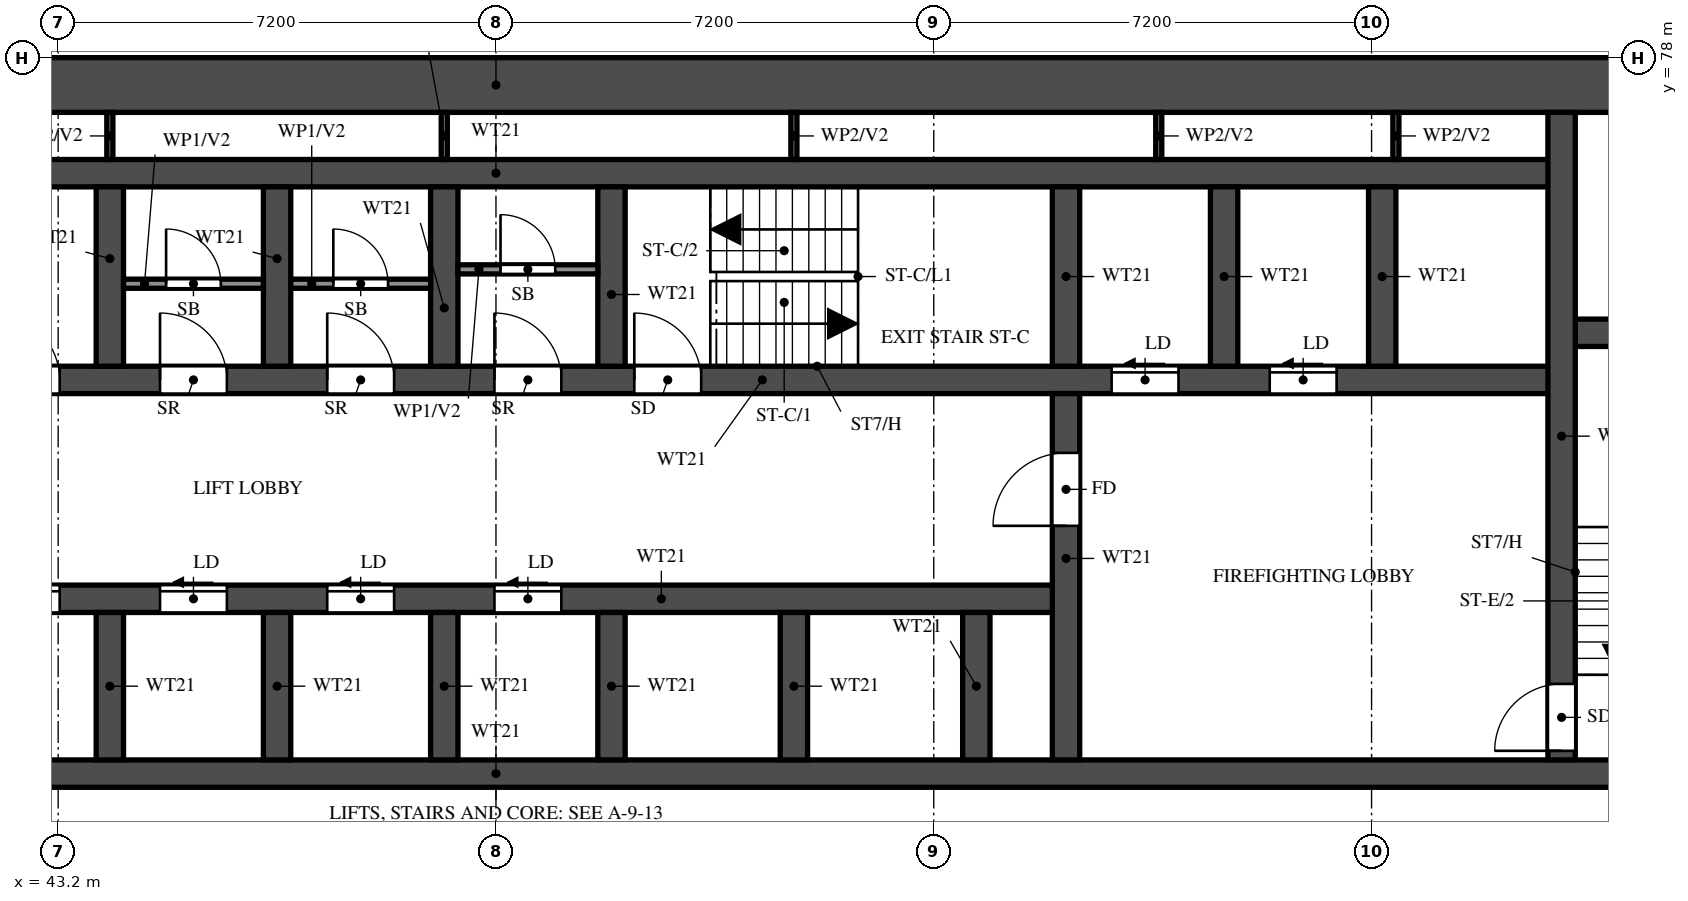
"""IFC4 building model, lengths in metres.
Left out: names, types, materials, properties, quantities, classifications, styles, units other than length and angle.
Written with IfcOpenShell. Run it as: python <this file> out.ifc"""

import sys

from ifc_helpers import new_model, si_unit, direction, frame, frame_2d, origin, place, context, subcontext, project, spatial, rectangle, extrude, element, fill, save


model = new_model("IFC4")
c1 = context("Model", 3, precision=1e-05, world=origin(), true_north=direction((0.0, 1.0)))
c2 = subcontext(c1, "Body", "Model", "MODEL_VIEW")
j1 = project(units=[si_unit("LENGTHUNIT", "METRE"), si_unit("PLANEANGLEUNIT", "RADIAN")], contexts=[c1])
p1 = place(None, origin())
s1 = spatial("IfcSite", under=j1, at=p1, CompositionType="ELEMENT")
p2 = place(p1, origin())
s2 = spatial("IfcBuilding", under=s1, at=p2, CompositionType="ELEMENT")
p3 = place(p2, frame((0.0, 0.0, 83.0)))
s3 = spatial("IfcBuildingStorey", under=s2, at=p3, CompositionType="ELEMENT", Elevation=83.0)
p4 = place(p3, frame((29.7, 77.55, 0.0), z_axis=(0.0, 0.0, 1.0), x_axis=(1.0, 0.0, 0.0)))
e1 = element("IfcWall", 1, at=p4, inside=s3, PredefinedType="SHEAR", context=c2, shape_type="SweptSolid", body=[
    extrude(rectangle(XDim=41.4, YDim=0.9, at=frame_2d((20.7, 0.0))), origin(), (0.0, 0.0, 1.0), 3.18),
])
p5 = place(p3, frame((29.7, 66.225, 0.0), z_axis=(0.0, 0.0, 1.0), x_axis=(1.0, 0.0, 0.0)))
e2 = element("IfcWall", 2, at=p5, inside=s3, PredefinedType="SHEAR", context=c2, shape_type="SweptSolid", body=[
    extrude(rectangle(XDim=41.4, YDim=0.45, at=frame_2d((20.7, 0.0))), origin(), (0.0, 0.0, 1.0), 3.18),
])
p6 = place(p5, frame((0.925, 0.0, 0.0)))
e3 = element("IfcOpeningElement", 3, at=p6, cuts=e2, PredefinedType="OPENING", context=c2, shape_type="SweptSolid", body=[
    extrude(rectangle(XDim=1.1, YDim=2.1, at=frame_2d((0.55, 1.05))), frame((0.0, 0.235, 0.0), z_axis=(0.0, -1.0, 0.0), x_axis=(1.0, 0.0, 0.0)), (0.0, 0.0, 1.0), 0.47),
])
p7 = place(p5, frame((3.738, 0.0, 0.0)))
e4 = element("IfcOpeningElement", 4, at=p7, cuts=e2, PredefinedType="OPENING", context=c2, shape_type="SweptSolid", body=[
    extrude(rectangle(XDim=1.8, YDim=2.1, at=frame_2d((0.9, 1.05))), frame((0.0, 0.235, 0.0), z_axis=(0.0, -1.0, 0.0), x_axis=(1.0, 0.0, 0.0)), (0.0, 0.0, 1.0), 0.47),
])
p8 = place(p3, frame((35.575, 69.1, 0.0), z_axis=(0.0, 0.0, 1.0), x_axis=(1.0, 0.0, 0.0)))
e5 = element("IfcWall", 5, at=p8, inside=s3, PredefinedType="SHEAR", context=c2, shape_type="SweptSolid", body=[
    extrude(rectangle(XDim=24.2, YDim=0.45, at=frame_2d((12.1, 0.0))), origin(), (0.0, 0.0, 1.0), 3.18),
])
p9 = place(p8, frame((1.05, 0.0, 0.0)))
e6 = element("IfcOpeningElement", 6, at=p9, cuts=e5, PredefinedType="OPENING", context=c2, shape_type="SweptSolid", body=[
    extrude(rectangle(XDim=1.1, YDim=2.1, at=frame_2d((0.55, 1.05))), frame((0.0, 0.235, 0.0), z_axis=(0.0, -1.0, 0.0), x_axis=(1.0, 0.0, 0.0)), (0.0, 0.0, 1.0), 0.47),
])
p10 = place(p8, frame((3.8, 0.0, 0.0)))
e7 = element("IfcOpeningElement", 7, at=p10, cuts=e5, PredefinedType="OPENING", context=c2, shape_type="SweptSolid", body=[
    extrude(rectangle(XDim=1.1, YDim=2.1, at=frame_2d((0.55, 1.05))), frame((0.0, 0.235, 0.0), z_axis=(0.0, -1.0, 0.0), x_axis=(1.0, 0.0, 0.0)), (0.0, 0.0, 1.0), 0.47),
])
p11 = place(p8, frame((6.55, 0.0, 0.0)))
e8 = element("IfcOpeningElement", 8, at=p11, cuts=e5, PredefinedType="OPENING", context=c2, shape_type="SweptSolid", body=[
    extrude(rectangle(XDim=1.1, YDim=2.1, at=frame_2d((0.55, 1.05))), frame((0.0, 0.235, 0.0), z_axis=(0.0, -1.0, 0.0), x_axis=(1.0, 0.0, 0.0)), (0.0, 0.0, 1.0), 0.47),
])
p12 = place(p8, frame((9.3, 0.0, 0.0)))
e9 = element("IfcOpeningElement", 9, at=p12, cuts=e5, PredefinedType="OPENING", context=c2, shape_type="SweptSolid", body=[
    extrude(rectangle(XDim=1.1, YDim=2.1, at=frame_2d((0.55, 1.05))), frame((0.0, 0.235, 0.0), z_axis=(0.0, -1.0, 0.0), x_axis=(1.0, 0.0, 0.0)), (0.0, 0.0, 1.0), 0.47),
])
p13 = place(p8, frame((12.05, 0.0, 0.0)))
e10 = element("IfcOpeningElement", 10, at=p13, cuts=e5, PredefinedType="OPENING", context=c2, shape_type="SweptSolid", body=[
    extrude(rectangle(XDim=1.1, YDim=2.1, at=frame_2d((0.55, 1.05))), frame((0.0, 0.235, 0.0), z_axis=(0.0, -1.0, 0.0), x_axis=(1.0, 0.0, 0.0)), (0.0, 0.0, 1.0), 0.47),
])
p14 = place(p8, frame((14.8, 0.0, 0.0)))
e11 = element("IfcOpeningElement", 11, at=p14, cuts=e5, PredefinedType="OPENING", context=c2, shape_type="SweptSolid", body=[
    extrude(rectangle(XDim=1.1, YDim=2.1, at=frame_2d((0.55, 1.05))), frame((0.0, 0.235, 0.0), z_axis=(0.0, -1.0, 0.0), x_axis=(1.0, 0.0, 0.0)), (0.0, 0.0, 1.0), 0.47),
])
p15 = place(p3, frame((32.875, 72.7, 0.0), z_axis=(0.0, 0.0, 1.0), x_axis=(1.0, 0.0, 0.0)))
e12 = element("IfcWall", 12, at=p15, inside=s3, PredefinedType="SHEAR", context=c2, shape_type="SweptSolid", body=[
    extrude(rectangle(XDim=35.05, YDim=0.45, at=frame_2d((17.525, 0.0))), origin(), (0.0, 0.0, 1.0), 3.18),
])
p16 = place(p15, frame((19.8, 0.0, 0.0)))
e13 = element("IfcOpeningElement", 13, at=p16, cuts=e12, PredefinedType="OPENING", context=c2, shape_type="SweptSolid", body=[
    extrude(rectangle(XDim=1.1, YDim=2.1, at=frame_2d((0.55, 1.05))), frame((0.0, 0.235, 0.0), z_axis=(0.0, -1.0, 0.0), x_axis=(1.0, 0.0, 0.0)), (0.0, 0.0, 1.0), 0.47),
])
p17 = place(p15, frame((27.65, 0.0, 0.0)))
e14 = element("IfcOpeningElement", 14, at=p17, cuts=e12, PredefinedType="OPENING", context=c2, shape_type="SweptSolid", body=[
    extrude(rectangle(XDim=1.1, YDim=2.1, at=frame_2d((0.55, 1.05))), frame((0.0, 0.235, 0.0), z_axis=(0.0, -1.0, 0.0), x_axis=(1.0, 0.0, 0.0)), (0.0, 0.0, 1.0), 0.47),
])
p18 = place(p15, frame((30.25, 0.0, 0.0)))
e15 = element("IfcOpeningElement", 15, at=p18, cuts=e12, PredefinedType="OPENING", context=c2, shape_type="SweptSolid", body=[
    extrude(rectangle(XDim=1.1, YDim=2.1, at=frame_2d((0.55, 1.05))), frame((0.0, 0.235, 0.0), z_axis=(0.0, -1.0, 0.0), x_axis=(1.0, 0.0, 0.0)), (0.0, 0.0, 1.0), 0.47),
])
p19 = place(p15, frame((3.75, 0.0, 0.0)))
e16 = element("IfcOpeningElement", 16, at=p19, cuts=e12, PredefinedType="OPENING", context=c2, shape_type="SweptSolid", body=[
    extrude(rectangle(XDim=1.1, YDim=2.1, at=frame_2d((0.55, 1.05))), frame((0.0, 0.235, 0.0), z_axis=(0.0, -1.0, 0.0), x_axis=(1.0, 0.0, 0.0)), (0.0, 0.0, 1.0), 0.47),
])
p20 = place(p15, frame((6.5, 0.0, 0.0)))
e17 = element("IfcOpeningElement", 17, at=p20, cuts=e12, PredefinedType="OPENING", context=c2, shape_type="SweptSolid", body=[
    extrude(rectangle(XDim=1.1, YDim=2.1, at=frame_2d((0.55, 1.05))), frame((0.0, 0.235, 0.0), z_axis=(0.0, -1.0, 0.0), x_axis=(1.0, 0.0, 0.0)), (0.0, 0.0, 1.0), 0.47),
])
p21 = place(p15, frame((9.25, 0.0, 0.0)))
e18 = element("IfcOpeningElement", 18, at=p21, cuts=e12, PredefinedType="OPENING", context=c2, shape_type="SweptSolid", body=[
    extrude(rectangle(XDim=1.1, YDim=2.1, at=frame_2d((0.55, 1.05))), frame((0.0, 0.235, 0.0), z_axis=(0.0, -1.0, 0.0), x_axis=(1.0, 0.0, 0.0)), (0.0, 0.0, 1.0), 0.47),
])
p22 = place(p15, frame((12.0, 0.0, 0.0)))
e19 = element("IfcOpeningElement", 19, at=p22, cuts=e12, PredefinedType="OPENING", context=c2, shape_type="SweptSolid", body=[
    extrude(rectangle(XDim=1.1, YDim=2.1, at=frame_2d((0.55, 1.05))), frame((0.0, 0.235, 0.0), z_axis=(0.0, -1.0, 0.0), x_axis=(1.0, 0.0, 0.0)), (0.0, 0.0, 1.0), 0.47),
])
p23 = place(p15, frame((14.75, 0.0, 0.0)))
e20 = element("IfcOpeningElement", 20, at=p23, cuts=e12, PredefinedType="OPENING", context=c2, shape_type="SweptSolid", body=[
    extrude(rectangle(XDim=1.1, YDim=2.1, at=frame_2d((0.55, 1.05))), frame((0.0, 0.235, 0.0), z_axis=(0.0, -1.0, 0.0), x_axis=(1.0, 0.0, 0.0)), (0.0, 0.0, 1.0), 0.47),
])
p24 = place(p15, frame((17.5, 0.0, 0.0)))
e21 = element("IfcOpeningElement", 21, at=p24, cuts=e12, PredefinedType="OPENING", context=c2, shape_type="SweptSolid", body=[
    extrude(rectangle(XDim=1.1, YDim=2.1, at=frame_2d((0.55, 1.05))), frame((0.0, 0.235, 0.0), z_axis=(0.0, -1.0, 0.0), x_axis=(1.0, 0.0, 0.0)), (0.0, 0.0, 1.0), 0.47),
])
p25 = place(p15, frame((0.913, 0.0, 0.0)))
e22 = element("IfcOpeningElement", 22, at=p25, cuts=e12, PredefinedType="OPENING", context=c2, shape_type="SweptSolid", body=[
    extrude(rectangle(XDim=1.1, YDim=2.1, at=frame_2d((0.55, 1.05))), frame((0.0, 0.235, 0.0), z_axis=(0.0, -1.0, 0.0), x_axis=(1.0, 0.0, 0.0)), (0.0, 0.0, 1.0), 0.47),
])
p26 = place(p3, frame((32.875, 76.1, 0.0), z_axis=(0.0, 0.0, 1.0), x_axis=(1.0, 0.0, 0.0)))
e23 = element("IfcWall", 23, at=p26, inside=s3, PredefinedType="SHEAR", context=c2, shape_type="SweptSolid", body=[
    extrude(rectangle(XDim=35.05, YDim=0.45, at=frame_2d((17.525, 0.0))), origin(), (0.0, 0.0, 1.0), 3.18),
])
p27 = place(p3, frame((67.925, 73.475, 0.0), z_axis=(0.0, 0.0, 1.0), x_axis=(1.0, 0.0, 0.0)))
e24 = element("IfcWall", 24, at=p27, inside=s3, PredefinedType="SHEAR", context=c2, shape_type="SweptSolid", body=[
    extrude(rectangle(XDim=3.175, YDim=0.45, at=frame_2d((1.587, 0.0))), origin(), (0.0, 0.0, 1.0), 3.18),
])
p28 = place(p3, frame((67.925, 66.45, 0.0), z_axis=(0.0, 0.0, 1.0), x_axis=(0.0, 1.0, 0.0)))
e25 = element("IfcWall", 25, at=p28, inside=s3, PredefinedType="SHEAR", context=c2, shape_type="SweptSolid", body=[
    extrude(rectangle(XDim=10.65, YDim=0.45, at=frame_2d((5.325, 0.0))), origin(), (0.0, 0.0, 1.0), 3.18),
])
p29 = place(p28, frame((0.15, 0.0, 0.0)))
e26 = element("IfcOpeningElement", 26, at=p29, cuts=e25, PredefinedType="OPENING", context=c2, shape_type="SweptSolid", body=[
    extrude(rectangle(XDim=1.1, YDim=2.1, at=frame_2d((0.55, 1.05))), frame((0.0, 0.235, 0.0), z_axis=(0.0, -1.0, 0.0), x_axis=(1.0, 0.0, 0.0)), (0.0, 0.0, 1.0), 0.47),
])
p30 = place(p3, frame((59.775, 66.45, 0.0), z_axis=(0.0, 0.0, 1.0), x_axis=(0.0, 1.0, 0.0)))
e27 = element("IfcWall", 27, at=p30, inside=s3, PredefinedType="SHEAR", context=c2, shape_type="SweptSolid", body=[
    extrude(rectangle(XDim=6.025, YDim=0.45, at=frame_2d((3.013, 0.0))), origin(), (0.0, 0.0, 1.0), 3.18),
])
p31 = place(p30, frame((3.85, 0.0, 0.0)))
e28 = element("IfcOpeningElement", 28, at=p31, cuts=e27, PredefinedType="OPENING", context=c2, shape_type="SweptSolid", body=[
    extrude(rectangle(XDim=1.2, YDim=2.1, at=frame_2d((0.6, 1.05))), frame((0.0, 0.235, 0.0), z_axis=(0.0, -1.0, 0.0), x_axis=(1.0, 0.0, 0.0)), (0.0, 0.0, 1.0), 0.47),
])
p32 = place(p3, frame((59.775, 72.925, 0.0), z_axis=(0.0, 0.0, 1.0), x_axis=(0.0, 1.0, 0.0)))
e29 = element("IfcWall", 29, at=p32, inside=s3, PredefinedType="SHEAR", context=c2, shape_type="SweptSolid", body=[
    extrude(rectangle(XDim=2.95, YDim=0.45, at=frame_2d((1.475, 0.0))), origin(), (0.0, 0.0, 1.0), 3.18),
])
for number, where, z_axis, x_axis in (
    (30, (44.05, 66.45, 0.0), (0.0, 0.0, 1.0), (0.0, 1.0, 0.0)),
    (31, (46.8, 66.45, 0.0), (0.0, 0.0, 1.0), (0.0, 1.0, 0.0)),
    (32, (49.55, 66.45, 0.0), (0.0, 0.0, 1.0), (0.0, 1.0, 0.0)),
    (33, (52.3, 66.45, 0.0), (0.0, 0.0, 1.0), (0.0, 1.0, 0.0)),
    (34, (55.3, 66.45, 0.0), (0.0, 0.0, 1.0), (0.0, 1.0, 0.0)),
    (35, (58.3, 66.45, 0.0), (0.0, 0.0, 1.0), (0.0, 1.0, 0.0)),
):
    element("IfcWall", number, at=place(p3, frame(where, z_axis=z_axis, x_axis=x_axis)), inside=s3, PredefinedType="SHEAR", context=c2, shape_type="SweptSolid", body=[
        extrude(rectangle(XDim=2.425, YDim=0.45, at=frame_2d((1.212, 0.0))), origin(), (0.0, 0.0, 1.0), 3.18),
    ])
for number, where, z_axis, x_axis in (
    (36, (44.05, 72.925, 0.0), (0.0, 0.0, 1.0), (0.0, 1.0, 0.0)),
    (37, (46.8, 72.925, 0.0), (0.0, 0.0, 1.0), (0.0, 1.0, 0.0)),
    (38, (49.55, 72.925, 0.0), (0.0, 0.0, 1.0), (0.0, 1.0, 0.0)),
    (39, (52.3, 72.925, 0.0), (0.0, 0.0, 1.0), (0.0, 1.0, 0.0)),
    (40, (62.375, 72.925, 0.0), (0.0, 0.0, 1.0), (0.0, 1.0, 0.0)),
    (41, (64.975, 72.925, 0.0), (0.0, 0.0, 1.0), (0.0, 1.0, 0.0)),
):
    element("IfcWall", number, at=place(p3, frame(where, z_axis=z_axis, x_axis=x_axis)), inside=s3, PredefinedType="SHEAR", context=c2, shape_type="SweptSolid", body=[
        extrude(rectangle(XDim=2.95, YDim=0.45, at=frame_2d((1.475, 0.0))), origin(), (0.0, 0.0, 1.0), 3.18),
    ])
p33 = place(p3, frame((44.275, 74.282, 0.0), z_axis=(0.0, 0.0, 1.0), x_axis=(1.0, 0.0, 0.0)))
e42 = element("IfcWall", 42, at=p33, inside=s3, PredefinedType="PARTITIONING", context=c2, shape_type="SweptSolid", body=[
    extrude(rectangle(XDim=2.3, YDim=0.15, at=frame_2d((1.15, 0.0))), origin(), (0.0, 0.0, 1.0), 3.18),
])
p34 = place(p33, frame((0.7, 0.0, 0.0)))
e43 = element("IfcOpeningElement", 43, at=p34, cuts=e42, PredefinedType="OPENING", context=c2, shape_type="SweptSolid", body=[
    extrude(rectangle(XDim=0.9, YDim=2.1, at=frame_2d((0.45, 1.05))), frame((0.0, 0.085, 0.0), z_axis=(0.0, -1.0, 0.0), x_axis=(1.0, 0.0, 0.0)), (0.0, 0.0, 1.0), 0.17),
])
p35 = place(p3, frame((47.025, 74.282, 0.0), z_axis=(0.0, 0.0, 1.0), x_axis=(1.0, 0.0, 0.0)))
e44 = element("IfcWall", 44, at=p35, inside=s3, PredefinedType="PARTITIONING", context=c2, shape_type="SweptSolid", body=[
    extrude(rectangle(XDim=2.3, YDim=0.15, at=frame_2d((1.15, 0.0))), origin(), (0.0, 0.0, 1.0), 3.18),
])
p36 = place(p35, frame((0.7, 0.0, 0.0)))
e45 = element("IfcOpeningElement", 45, at=p36, cuts=e44, PredefinedType="OPENING", context=c2, shape_type="SweptSolid", body=[
    extrude(rectangle(XDim=0.9, YDim=2.1, at=frame_2d((0.45, 1.05))), frame((0.0, 0.085, 0.0), z_axis=(0.0, -1.0, 0.0), x_axis=(1.0, 0.0, 0.0)), (0.0, 0.0, 1.0), 0.17),
])
p37 = place(p3, frame((49.775, 74.518, 0.0), z_axis=(0.0, 0.0, 1.0), x_axis=(1.0, 0.0, 0.0)))
e46 = element("IfcWall", 46, at=p37, inside=s3, PredefinedType="PARTITIONING", context=c2, shape_type="SweptSolid", body=[
    extrude(rectangle(XDim=2.3, YDim=0.15, at=frame_2d((1.15, 0.0))), origin(), (0.0, 0.0, 1.0), 3.18),
])
p38 = place(p37, frame((0.7, 0.0, 0.0)))
e47 = element("IfcOpeningElement", 47, at=p38, cuts=e46, PredefinedType="OPENING", context=c2, shape_type="SweptSolid", body=[
    extrude(rectangle(XDim=0.9, YDim=2.1, at=frame_2d((0.45, 1.05))), frame((0.0, 0.085, 0.0), z_axis=(0.0, -1.0, 0.0), x_axis=(1.0, 0.0, 0.0)), (0.0, 0.0, 1.0), 0.17),
])
for number, where, z_axis, x_axis in (
    (48, (44.05, 76.325, 0.0), (0.0, 0.0, 1.0), (0.0, 1.0, 0.0)),
    (49, (49.55, 76.325, 0.0), (0.0, 0.0, 1.0), (0.0, 1.0, 0.0)),
    (50, (55.3, 76.325, 0.0), (0.0, 0.0, 1.0), (0.0, 1.0, 0.0)),
    (51, (61.3, 76.325, 0.0), (0.0, 0.0, 1.0), (0.0, 1.0, 0.0)),
    (52, (65.2, 76.325, 0.0), (0.0, 0.0, 1.0), (0.0, 1.0, 0.0)),
):
    element("IfcWall", number, at=place(p3, frame(where, z_axis=z_axis, x_axis=x_axis)), inside=s3, PredefinedType="PARTITIONING", context=c2, shape_type="SweptSolid", body=[
        extrude(rectangle(XDim=0.775, YDim=0.1, at=frame_2d((0.388, 0.0))), origin(), (0.0, 0.0, 1.0), 3.18),
    ])
p39 = place(p16, origin())
e53 = element("IfcDoor", 53, at=p39, inside=s3, OperationType="SINGLE_SWING_LEFT", PredefinedType="DOOR", context=c2, shape_type="SweptSolid", body=[
    extrude(rectangle(XDim=1.1, YDim=2.1, at=frame_2d((0.55, 1.05))), frame((0.0, 0.025, 0.0), z_axis=(0.0, -1.0, 0.0), x_axis=(1.0, 0.0, 0.0)), (0.0, 0.0, 1.0), 0.05),
])
fill(e13, e53)
p40 = place(p29, origin())
e54 = element("IfcDoor", 54, at=p40, inside=s3, OperationType="SINGLE_SWING_LEFT", PredefinedType="DOOR", context=c2, shape_type="SweptSolid", body=[
    extrude(rectangle(XDim=1.1, YDim=2.1, at=frame_2d((0.55, 1.05))), frame((0.0, 0.025, 0.0), z_axis=(0.0, -1.0, 0.0), x_axis=(1.0, 0.0, 0.0)), (0.0, 0.0, 1.0), 0.05),
])
fill(e26, e54)
p41 = place(p31, origin())
e55 = element("IfcDoor", 55, at=p41, inside=s3, OperationType="SINGLE_SWING_RIGHT", PredefinedType="DOOR", context=c2, shape_type="SweptSolid", body=[
    extrude(rectangle(XDim=1.2, YDim=2.1, at=frame_2d((0.6, 1.05))), frame((0.0, 0.025, 0.0), z_axis=(0.0, -1.0, 0.0), x_axis=(1.0, 0.0, 0.0)), (0.0, 0.0, 1.0), 0.05),
])
fill(e28, e55)
p42 = place(p17, origin())
e56 = element("IfcDoor", 56, at=p42, inside=s3, OperationType="SLIDING_TO_LEFT", PredefinedType="DOOR", context=c2, shape_type="SweptSolid", body=[
    extrude(rectangle(XDim=1.1, YDim=2.1, at=frame_2d((0.55, 1.05))), frame((0.0, 0.025, 0.0), z_axis=(0.0, -1.0, 0.0), x_axis=(1.0, 0.0, 0.0)), (0.0, 0.0, 1.0), 0.05),
])
fill(e14, e56)
p43 = place(p18, origin())
e57 = element("IfcDoor", 57, at=p43, inside=s3, OperationType="SLIDING_TO_LEFT", PredefinedType="DOOR", context=c2, shape_type="SweptSolid", body=[
    extrude(rectangle(XDim=1.1, YDim=2.1, at=frame_2d((0.55, 1.05))), frame((0.0, 0.025, 0.0), z_axis=(0.0, -1.0, 0.0), x_axis=(1.0, 0.0, 0.0)), (0.0, 0.0, 1.0), 0.05),
])
fill(e15, e57)
p44 = place(p11, origin())
e58 = element("IfcDoor", 58, at=p44, inside=s3, OperationType="SLIDING_TO_LEFT", PredefinedType="DOOR", context=c2, shape_type="SweptSolid", body=[
    extrude(rectangle(XDim=1.1, YDim=2.1, at=frame_2d((0.55, 1.05))), frame((0.0, 0.025, 0.0), z_axis=(0.0, -1.0, 0.0), x_axis=(1.0, 0.0, 0.0)), (0.0, 0.0, 1.0), 0.05),
])
fill(e8, e58)
p45 = place(p12, origin())
e59 = element("IfcDoor", 59, at=p45, inside=s3, OperationType="SLIDING_TO_LEFT", PredefinedType="DOOR", context=c2, shape_type="SweptSolid", body=[
    extrude(rectangle(XDim=1.1, YDim=2.1, at=frame_2d((0.55, 1.05))), frame((0.0, 0.025, 0.0), z_axis=(0.0, -1.0, 0.0), x_axis=(1.0, 0.0, 0.0)), (0.0, 0.0, 1.0), 0.05),
])
fill(e9, e59)
p46 = place(p13, origin())
e60 = element("IfcDoor", 60, at=p46, inside=s3, OperationType="SLIDING_TO_LEFT", PredefinedType="DOOR", context=c2, shape_type="SweptSolid", body=[
    extrude(rectangle(XDim=1.1, YDim=2.1, at=frame_2d((0.55, 1.05))), frame((0.0, 0.025, 0.0), z_axis=(0.0, -1.0, 0.0), x_axis=(1.0, 0.0, 0.0)), (0.0, 0.0, 1.0), 0.05),
])
fill(e10, e60)
p47 = place(p14, origin())
e61 = element("IfcDoor", 61, at=p47, inside=s3, OperationType="SLIDING_TO_LEFT", PredefinedType="DOOR", context=c2, shape_type="SweptSolid", body=[
    extrude(rectangle(XDim=1.1, YDim=2.1, at=frame_2d((0.55, 1.05))), frame((0.0, 0.025, 0.0), z_axis=(0.0, -1.0, 0.0), x_axis=(1.0, 0.0, 0.0)), (0.0, 0.0, 1.0), 0.05),
])
fill(e11, e61)
p48 = place(p21, origin())
e62 = element("IfcDoor", 62, at=p48, inside=s3, OperationType="SINGLE_SWING_LEFT", PredefinedType="DOOR", context=c2, shape_type="SweptSolid", body=[
    extrude(rectangle(XDim=1.1, YDim=2.1, at=frame_2d((0.55, 1.05))), frame((0.0, 0.025, 0.0), z_axis=(0.0, -1.0, 0.0), x_axis=(1.0, 0.0, 0.0)), (0.0, 0.0, 1.0), 0.05),
])
fill(e18, e62)
p49 = place(p22, origin())
e63 = element("IfcDoor", 63, at=p49, inside=s3, OperationType="SINGLE_SWING_LEFT", PredefinedType="DOOR", context=c2, shape_type="SweptSolid", body=[
    extrude(rectangle(XDim=1.1, YDim=2.1, at=frame_2d((0.55, 1.05))), frame((0.0, 0.025, 0.0), z_axis=(0.0, -1.0, 0.0), x_axis=(1.0, 0.0, 0.0)), (0.0, 0.0, 1.0), 0.05),
])
fill(e19, e63)
p50 = place(p34, origin())
e64 = element("IfcDoor", 64, at=p50, inside=s3, OperationType="SINGLE_SWING_RIGHT", PredefinedType="DOOR", context=c2, shape_type="SweptSolid", body=[
    extrude(rectangle(XDim=0.9, YDim=2.1, at=frame_2d((0.45, 1.05))), frame((0.0, 0.025, 0.0), z_axis=(0.0, -1.0, 0.0), x_axis=(1.0, 0.0, 0.0)), (0.0, 0.0, 1.0), 0.05),
])
fill(e43, e64)
p51 = place(p23, origin())
e65 = element("IfcDoor", 65, at=p51, inside=s3, OperationType="SINGLE_SWING_LEFT", PredefinedType="DOOR", context=c2, shape_type="SweptSolid", body=[
    extrude(rectangle(XDim=1.1, YDim=2.1, at=frame_2d((0.55, 1.05))), frame((0.0, 0.025, 0.0), z_axis=(0.0, -1.0, 0.0), x_axis=(1.0, 0.0, 0.0)), (0.0, 0.0, 1.0), 0.05),
])
fill(e20, e65)
p52 = place(p36, origin())
e66 = element("IfcDoor", 66, at=p52, inside=s3, OperationType="SINGLE_SWING_LEFT", PredefinedType="DOOR", context=c2, shape_type="SweptSolid", body=[
    extrude(rectangle(XDim=0.9, YDim=2.1, at=frame_2d((0.45, 1.05))), frame((0.0, 0.025, 0.0), z_axis=(0.0, -1.0, 0.0), x_axis=(1.0, 0.0, 0.0)), (0.0, 0.0, 1.0), 0.05),
])
fill(e45, e66)
p53 = place(p24, origin())
e67 = element("IfcDoor", 67, at=p53, inside=s3, OperationType="SINGLE_SWING_LEFT", PredefinedType="DOOR", context=c2, shape_type="SweptSolid", body=[
    extrude(rectangle(XDim=1.1, YDim=2.1, at=frame_2d((0.55, 1.05))), frame((0.0, 0.025, 0.0), z_axis=(0.0, -1.0, 0.0), x_axis=(1.0, 0.0, 0.0)), (0.0, 0.0, 1.0), 0.05),
])
fill(e21, e67)
p54 = place(p38, origin())
e68 = element("IfcDoor", 68, at=p54, inside=s3, OperationType="SINGLE_SWING_LEFT", PredefinedType="DOOR", context=c2, shape_type="SweptSolid", body=[
    extrude(rectangle(XDim=0.9, YDim=2.1, at=frame_2d((0.45, 1.05))), frame((0.0, 0.025, 0.0), z_axis=(0.0, -1.0, 0.0), x_axis=(1.0, 0.0, 0.0)), (0.0, 0.0, 1.0), 0.05),
])
fill(e47, e68)
save(model, sys.argv[1])
